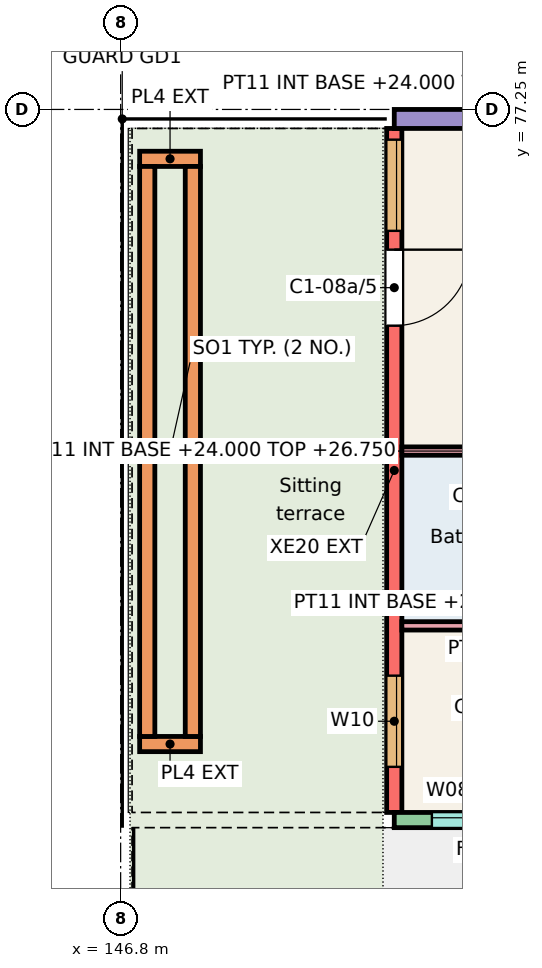
"""IFC4 building model, lengths in metres.
Left out: names, types, materials, properties, quantities, classifications, styles, units other than length and angle.
Written with IfcOpenShell. Run it as: python <this file> out.ifc"""

import sys

from ifc_helpers import new_model, si_unit, direction, frame, frame_2d, origin, place, context, subcontext, project, spatial, rectangle, extrude, element, fill, save


model = new_model("IFC4")
c1 = context("Model", 3, precision=1e-05, world=origin(), true_north=direction((0.0, 1.0)))
c2 = subcontext(c1, "Body", "Model", "MODEL_VIEW")
j1 = project(units=[si_unit("LENGTHUNIT", "METRE"), si_unit("PLANEANGLEUNIT", "RADIAN")], contexts=[c1])
p1 = place(None, origin())
s1 = spatial("IfcSite", under=j1, at=p1, CompositionType="ELEMENT")
p2 = place(p1, origin())
s2 = spatial("IfcBuilding", under=s1, at=p2, CompositionType="ELEMENT")
p3 = place(p2, frame((0.0, 0.0, 24.0)))
s3 = spatial("IfcBuildingStorey", under=s2, at=p3, CompositionType="ELEMENT", Elevation=24.0)
p4 = place(p3, frame((150.4, 68.0, 0.0), z_axis=(0.0, 0.0, 1.0), x_axis=(0.0, 1.0, 0.0)))
e1 = element("IfcWall", 1, at=p4, inside=s3, PredefinedType="SHEAR", context=c2, shape_type="SweptSolid", body=[
    extrude(rectangle(XDim=9.0, YDim=0.2, at=frame_2d((4.5, 0.0))), origin(), (0.0, 0.0, 1.0), 3.0),
])
p5 = place(p4, frame((0.6, 0.0, 0.9)))
e2 = element("IfcOpeningElement", 2, at=p5, cuts=e1, PredefinedType="OPENING", context=c2, shape_type="SweptSolid", body=[
    extrude(rectangle(XDim=1.2, YDim=1.5, at=frame_2d((0.6, 0.75))), frame((0.0, 0.11, 0.0), z_axis=(0.0, -1.0, 0.0), x_axis=(1.0, 0.0, 0.0)), (0.0, 0.0, 1.0), 0.22),
])
p6 = place(p4, frame((7.653, 0.0, 0.9)))
e3 = element("IfcOpeningElement", 3, at=p6, cuts=e1, PredefinedType="OPENING", context=c2, shape_type="SweptSolid", body=[
    extrude(rectangle(XDim=1.2, YDim=1.5, at=frame_2d((0.6, 0.75))), frame((0.0, 0.11, 0.0), z_axis=(0.0, -1.0, 0.0), x_axis=(1.0, 0.0, 0.0)), (0.0, 0.0, 1.0), 0.22),
])
p7 = place(p4, frame((6.405, 0.0, 0.0)))
e4 = element("IfcOpeningElement", 4, at=p7, cuts=e1, PredefinedType="OPENING", context=c2, shape_type="SweptSolid", body=[
    extrude(rectangle(XDim=1.0, YDim=2.1, at=frame_2d((0.5, 1.05))), frame((0.0, 0.11, 0.0), z_axis=(0.0, -1.0, 0.0), x_axis=(1.0, 0.0, 0.0)), (0.0, 0.0, 1.0), 0.22),
])
p8 = place(p3, frame((150.4, 77.125, 0.0), z_axis=(0.0, 0.0, 1.0), x_axis=(1.0, 0.0, 0.0)))
e5 = element("IfcWall", 5, at=p8, inside=s3, PredefinedType="SOLIDWALL", context=c2, shape_type="SweptSolid", body=[
    extrude(rectangle(XDim=3.6, YDim=0.25, at=frame_2d((1.8, 0.0))), origin(), (0.0, 0.0, 1.0), 3.0),
])
p9 = place(p8, frame((1.05, 0.0, 0.9)))
e6 = element("IfcOpeningElement", 6, at=p9, cuts=e5, PredefinedType="OPENING", context=c2, shape_type="SweptSolid", body=[
    extrude(rectangle(XDim=1.5, YDim=1.5, at=frame_2d((0.75, 0.75))), frame((0.0, 0.135, 0.0), z_axis=(0.0, -1.0, 0.0), x_axis=(1.0, 0.0, 0.0)), (0.0, 0.0, 1.0), 0.27),
])
p10 = place(p3, frame((150.4, 67.9, 0.0), z_axis=(0.0, 0.0, 1.0), x_axis=(1.0, 0.0, 0.0)))
e7 = element("IfcWall", 7, at=p10, inside=s3, PredefinedType="SOLIDWALL", context=c2, shape_type="SweptSolid", body=[
    extrude(rectangle(XDim=3.6, YDim=0.2, at=frame_2d((1.8, 0.0))), origin(), (0.0, 0.0, 1.0), 3.0),
])
p11 = place(p10, frame((0.495, 0.0, 1.1)))
e8 = element("IfcOpeningElement", 8, at=p11, cuts=e7, PredefinedType="OPENING", context=c2, shape_type="SweptSolid", body=[
    extrude(rectangle(XDim=1.2, YDim=1.3, at=frame_2d((0.6, 0.65))), frame((0.0, 0.11, 0.0), z_axis=(0.0, -1.0, 0.0), x_axis=(1.0, 0.0, 0.0)), (0.0, 0.0, 1.0), 0.22),
])
p12 = place(p10, frame((2.35, 0.0, 0.0)))
e9 = element("IfcOpeningElement", 9, at=p12, cuts=e7, PredefinedType="OPENING", context=c2, shape_type="SweptSolid", body=[
    extrude(rectangle(XDim=1.0, YDim=2.1, at=frame_2d((0.5, 1.05))), frame((0.0, 0.11, 0.0), z_axis=(0.0, -1.0, 0.0), x_axis=(1.0, 0.0, 0.0)), (0.0, 0.0, 1.0), 0.22),
])
for number, where, z_axis, x_axis in (
    (10, (147.05, 68.9, 0.01), (0.0, 0.0, 1.0), (1.0, 0.0, 0.0)),
    (11, (147.05, 76.6, 0.01), (0.0, 0.0, 1.0), (1.0, 0.0, 0.0)),
):
    element("IfcWall", number, at=place(p3, frame(where, z_axis=z_axis, x_axis=x_axis)), inside=s3, PredefinedType="SOLIDWALL", context=c2, shape_type="SweptSolid", body=[
        extrude(rectangle(XDim=0.8, YDim=0.2, at=frame_2d((0.4, 0.0))), origin(), (0.0, 0.0, 1.0), 0.45),
    ])
for number, where, z_axis, x_axis in (
    (12, (147.15, 69.0, 0.01), (0.0, 0.0, 1.0), (0.0, 1.0, 0.0)),
    (13, (147.75, 69.0, 0.01), (0.0, 0.0, 1.0), (0.0, 1.0, 0.0)),
):
    element("IfcWall", number, at=place(p3, frame(where, z_axis=z_axis, x_axis=x_axis)), inside=s3, PredefinedType="SOLIDWALL", context=c2, shape_type="SweptSolid", body=[
        extrude(rectangle(XDim=7.5, YDim=0.2, at=frame_2d((3.75, 0.0))), origin(), (0.0, 0.0, 1.0), 0.45),
    ])
p13 = place(p3, frame((150.5, 70.455, 0.0), z_axis=(0.0, 0.0, 1.0), x_axis=(1.0, 0.0, 0.0)))
e14 = element("IfcWall", 14, at=p13, inside=s3, PredefinedType="PARTITIONING", context=c2, shape_type="SweptSolid", body=[
    extrude(rectangle(XDim=1.99, YDim=0.11, at=frame_2d((0.995, 0.0))), origin(), (0.0, 0.0, 1.0), 2.75),
])
p14 = place(p3, frame((150.5, 72.755, 0.0), z_axis=(0.0, 0.0, 1.0), x_axis=(1.0, 0.0, 0.0)))
e15 = element("IfcWall", 15, at=p14, inside=s3, PredefinedType="PARTITIONING", context=c2, shape_type="SweptSolid", body=[
    extrude(rectangle(XDim=3.4, YDim=0.11, at=frame_2d((1.7, 0.0))), origin(), (0.0, 0.0, 1.0), 2.75),
])
p15 = place(p14, frame((2.3, 0.0, 0.0)))
e16 = element("IfcOpeningElement", 16, at=p15, cuts=e15, PredefinedType="OPENING", context=c2, shape_type="SweptSolid", body=[
    extrude(rectangle(XDim=0.9, YDim=2.1, at=frame_2d((0.45, 1.05))), frame((0.0, 0.065, 0.0), z_axis=(0.0, -1.0, 0.0), x_axis=(1.0, 0.0, 0.0)), (0.0, 0.0, 1.0), 0.13),
])
p16 = place(p11, origin())
e17 = element("IfcWindow", 17, at=p16, inside=s3, PartitioningType="SINGLE_PANEL", PredefinedType="WINDOW", context=c2, shape_type="SweptSolid", body=[
    extrude(rectangle(XDim=1.2, YDim=1.3, at=frame_2d((0.6, 0.65))), frame((0.0, 0.06, 0.0), z_axis=(0.0, -1.0, 0.0), x_axis=(1.0, 0.0, 0.0)), (0.0, 0.0, 1.0), 0.06),
])
fill(e8, e17)
p17 = place(p5, origin())
e18 = element("IfcWindow", 18, at=p17, inside=s3, PartitioningType="SINGLE_PANEL", PredefinedType="WINDOW", context=c2, shape_type="SweptSolid", body=[
    extrude(rectangle(XDim=1.2, YDim=1.5, at=frame_2d((0.6, 0.75))), frame((0.0, 0.0, 0.0), z_axis=(0.0, -1.0, 0.0), x_axis=(1.0, 0.0, 0.0)), (0.0, 0.0, 1.0), 0.06),
])
fill(e2, e18)
p18 = place(p6, origin())
e19 = element("IfcWindow", 19, at=p18, inside=s3, PartitioningType="SINGLE_PANEL", PredefinedType="WINDOW", context=c2, shape_type="SweptSolid", body=[
    extrude(rectangle(XDim=1.2, YDim=1.5, at=frame_2d((0.6, 0.75))), frame((0.0, 0.0, 0.0), z_axis=(0.0, -1.0, 0.0), x_axis=(1.0, 0.0, 0.0)), (0.0, 0.0, 1.0), 0.06),
])
fill(e3, e19)
p19 = place(p7, origin())
e20 = element("IfcDoor", 20, at=p19, inside=s3, OperationType="SINGLE_SWING_RIGHT", PredefinedType="DOOR", context=c2, shape_type="SweptSolid", body=[
    extrude(rectangle(XDim=1.0, YDim=2.1, at=frame_2d((0.5, 1.05))), frame((0.0, 0.025, 0.0), z_axis=(0.0, -1.0, 0.0), x_axis=(1.0, 0.0, 0.0)), (0.0, 0.0, 1.0), 0.05),
])
fill(e4, e20)
save(model, sys.argv[1])
